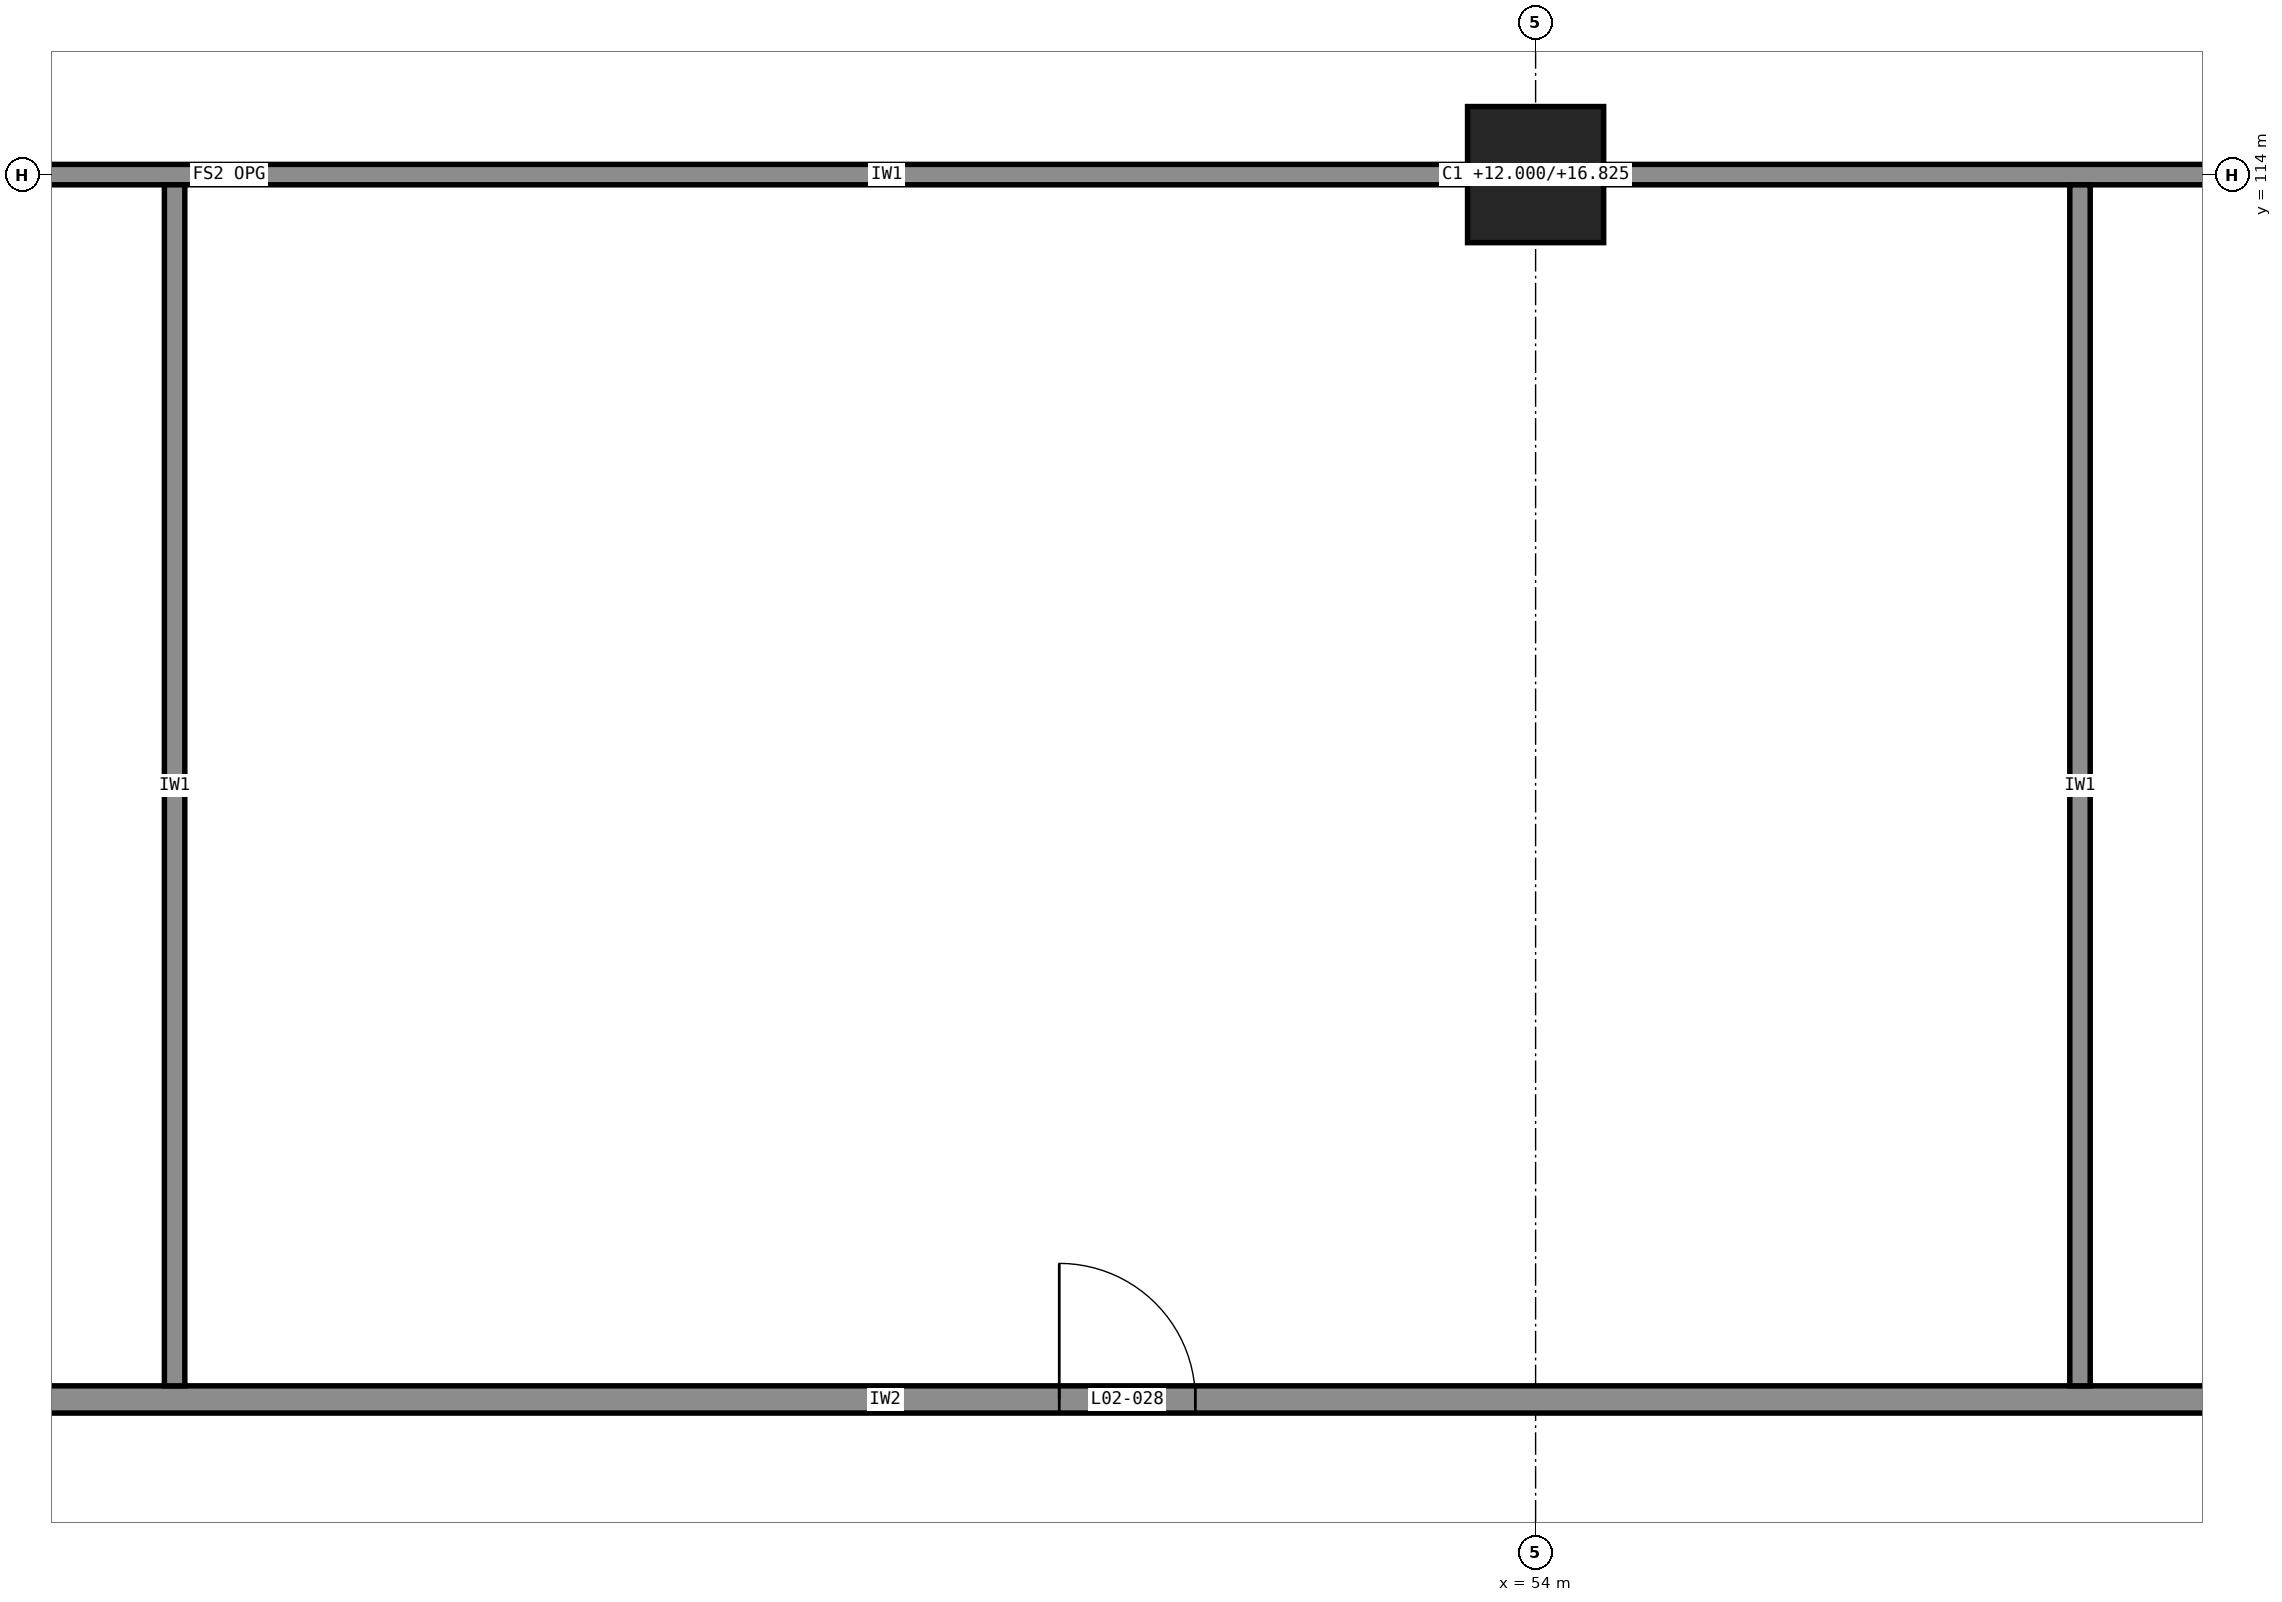
"""IFC4 building model, lengths in metres.
Left out: names, types, materials, properties, quantities, classifications, styles, units other than length and angle.
Written with IfcOpenShell. Run it as: python <this file> out.ifc"""

import sys

from ifc_helpers import new_model, si_unit, direction, frame, frame_2d, origin, origin_2d, place, context, subcontext, project, spatial, rectangle, extrude, element, fill, save


model = new_model("IFC4")
c1 = context("Model", 3, precision=1e-05, world=origin(), true_north=direction((0.0, 1.0)))
c2 = subcontext(c1, "Body", "Model", "MODEL_VIEW")
j1 = project(units=[si_unit("LENGTHUNIT", "METRE"), si_unit("PLANEANGLEUNIT", "RADIAN")], contexts=[c1])
p1 = place(None, origin())
s1 = spatial("IfcSite", under=j1, at=p1, CompositionType="ELEMENT")
p2 = place(p1, origin())
s2 = spatial("IfcBuilding", under=s1, at=p2, CompositionType="ELEMENT")
p3 = place(p2, frame((0.0, 0.0, 12.0)))
s3 = spatial("IfcBuildingStorey", under=s2, at=p3, CompositionType="ELEMENT", Elevation=12.0)
p4 = place(p3, frame((54.0, 114.0, 0.0), z_axis=(0.0, 0.0, 1.0), x_axis=(1.0, 0.0, 0.0)))
e1 = element("IfcColumn", 1, at=p4, inside=s3, PredefinedType="COLUMN", context=c2, shape_type="SweptSolid", body=[
    extrude(rectangle(XDim=1.0, YDim=1.0, at=origin_2d()), origin(), (0.0, 0.0, 1.0), 4.825),
])
p5 = place(p3, frame((33.5, 105.0, 0.0), z_axis=(0.0, 0.0, 1.0), x_axis=(1.0, 0.0, 0.0)))
e2 = element("IfcWall", 2, at=p5, inside=s3, PredefinedType="PARTITIONING", context=c2, shape_type="SweptSolid", body=[
    extrude(rectangle(XDim=38.6, YDim=0.2, at=frame_2d((19.3, 0.0))), origin(), (0.0, 0.0, 1.0), 4.825),
])
p6 = place(p5, frame((4.8, 0.0, 0.0)))
e3 = element("IfcOpeningElement", 3, at=p6, cuts=e2, PredefinedType="OPENING", context=c2, shape_type="SweptSolid", body=[
    extrude(rectangle(XDim=1.0, YDim=2.1, at=frame_2d((0.5, 1.05))), frame((0.0, 0.11, 0.0), z_axis=(0.0, -1.0, 0.0), x_axis=(1.0, 0.0, 0.0)), (0.0, 0.0, 1.0), 0.22),
])
p7 = place(p5, frame((17.0, 0.0, 0.0)))
e4 = element("IfcOpeningElement", 4, at=p7, cuts=e2, PredefinedType="OPENING", context=c2, shape_type="SweptSolid", body=[
    extrude(rectangle(XDim=1.0, YDim=2.1, at=frame_2d((0.5, 1.05))), frame((0.0, 0.11, 0.0), z_axis=(0.0, -1.0, 0.0), x_axis=(1.0, 0.0, 0.0)), (0.0, 0.0, 1.0), 0.22),
])
p8 = place(p5, frame((31.0, 0.0, 0.0)))
e5 = element("IfcOpeningElement", 5, at=p8, cuts=e2, PredefinedType="OPENING", context=c2, shape_type="SweptSolid", body=[
    extrude(rectangle(XDim=1.0, YDim=2.1, at=frame_2d((0.5, 1.05))), frame((0.0, 0.11, 0.0), z_axis=(0.0, -1.0, 0.0), x_axis=(1.0, 0.0, 0.0)), (0.0, 0.0, 1.0), 0.22),
])
p9 = place(p3, frame((33.525, 114.0, 0.0), z_axis=(0.0, 0.0, 1.0), x_axis=(1.0, 0.0, 0.0)))
e6 = element("IfcWall", 6, at=p9, inside=s3, PredefinedType="PARTITIONING", context=c2, shape_type="SweptSolid", body=[
    extrude(rectangle(XDim=38.575, YDim=0.15, at=frame_2d((19.288, 0.0))), origin(), (0.0, 0.0, 1.0), 4.825),
])
for number, where, z_axis, x_axis in (
    (7, (44.0, 105.1, 0.0), (0.0, 0.0, 1.0), (0.0, 1.0, 0.0)),
    (8, (58.0, 105.1, 0.0), (0.0, 0.0, 1.0), (0.0, 1.0, 0.0)),
):
    element("IfcWall", number, at=place(p3, frame(where, z_axis=z_axis, x_axis=x_axis)), inside=s3, PredefinedType="PARTITIONING", context=c2, shape_type="SweptSolid", body=[
        extrude(rectangle(XDim=8.825, YDim=0.15, at=frame_2d((4.413, 0.0))), origin(), (0.0, 0.0, 1.0), 4.825),
    ])
p10 = place(p7, origin())
e9 = element("IfcDoor", 9, at=p10, inside=s3, OperationType="SINGLE_SWING_RIGHT", PredefinedType="DOOR", context=c2, shape_type="SweptSolid", body=[
    extrude(rectangle(XDim=1.0, YDim=2.1, at=frame_2d((0.5, 1.05))), frame((0.0, 0.025, 0.0), z_axis=(0.0, -1.0, 0.0), x_axis=(1.0, 0.0, 0.0)), (0.0, 0.0, 1.0), 0.05),
])
fill(e4, e9)
save(model, sys.argv[1])
